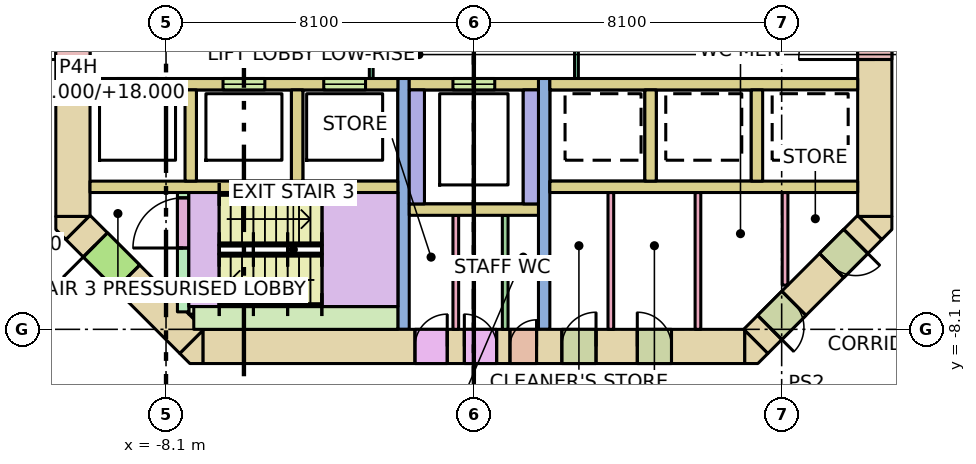
"""IFC4 building model, lengths in metres.
Left out: names, types, materials, properties, quantities, classifications, styles, units other than length and angle.
Written with IfcOpenShell. Run it as: python <this file> out.ifc"""

import sys

from ifc_helpers import new_model, si_unit, direction, frame, frame_2d, origin, place, context, subcontext, project, spatial, polyline, rectangle, outline, extrude, element, fill, save


model = new_model("IFC4")
c1 = context("Model", 3, precision=1e-05, world=origin(), true_north=direction((0.0, 1.0)))
c2 = subcontext(c1, "Body", "Model", "MODEL_VIEW")
j1 = project(units=[si_unit("LENGTHUNIT", "METRE"), si_unit("PLANEANGLEUNIT", "RADIAN")], contexts=[c1])
p1 = place(None, origin())
s1 = spatial("IfcSite", under=j1, at=p1, CompositionType="ELEMENT")
p2 = place(p1, origin())
s2 = spatial("IfcBuilding", under=s1, at=p2, CompositionType="ELEMENT")
p3 = place(p2, frame((0.0, 0.0, 13.0)))
s3 = spatial("IfcBuildingStorey", under=s2, at=p3, CompositionType="ELEMENT", Elevation=13.0)
p4 = place(p3, frame((-7.13, -8.55, -0.32), z_axis=(0.0, 0.0, 1.0), x_axis=(1.0, 0.0, 0.0)))
e1 = element("IfcWall", 1, at=p4, inside=s3, PredefinedType="SHEAR", context=c2, shape_type="SweptSolid", body=[
    extrude(rectangle(XDim=14.26, YDim=0.9, at=frame_2d((7.13, 0.0))), origin(), (0.0, 0.0, 1.0), 7.0),
])
p5 = place(p4, frame((8.08, 0.0, 0.32)))
e2 = element("IfcOpeningElement", 2, at=p5, cuts=e1, PredefinedType="OPENING", context=c2, shape_type="SweptSolid", body=[
    extrude(rectangle(XDim=0.7, YDim=2.1, at=frame_2d((0.35, 1.05))), frame((0.0, 0.46, 0.0), z_axis=(0.0, -1.0, 0.0), x_axis=(1.0, 0.0, 0.0)), (0.0, 0.0, 1.0), 0.92),
])
p6 = place(p4, frame((5.58, 0.0, 0.32)))
e3 = element("IfcOpeningElement", 3, at=p6, cuts=e1, PredefinedType="OPENING", context=c2, shape_type="SweptSolid", body=[
    extrude(rectangle(XDim=0.85, YDim=2.1, at=frame_2d((0.425, 1.05))), frame((0.0, 0.46, 0.0), z_axis=(0.0, -1.0, 0.0), x_axis=(1.0, 0.0, 0.0)), (0.0, 0.0, 1.0), 0.92),
])
p7 = place(p4, frame((6.88, 0.0, 0.32)))
e4 = element("IfcOpeningElement", 4, at=p7, cuts=e1, PredefinedType="OPENING", context=c2, shape_type="SweptSolid", body=[
    extrude(rectangle(XDim=0.85, YDim=2.1, at=frame_2d((0.425, 1.05))), frame((0.0, 0.46, 0.0), z_axis=(0.0, -1.0, 0.0), x_axis=(1.0, 0.0, 0.0)), (0.0, 0.0, 1.0), 0.92),
])
p8 = place(p4, frame((9.445, 0.0, 0.32)))
e5 = element("IfcOpeningElement", 5, at=p8, cuts=e1, PredefinedType="OPENING", context=c2, shape_type="SweptSolid", body=[
    extrude(rectangle(XDim=0.9, YDim=2.1, at=frame_2d((0.45, 1.05))), frame((0.0, 0.46, 0.0), z_axis=(0.0, -1.0, 0.0), x_axis=(1.0, 0.0, 0.0)), (0.0, 0.0, 1.0), 0.92),
])
p9 = place(p4, frame((11.431, 0.0, 0.32)))
e6 = element("IfcOpeningElement", 6, at=p9, cuts=e1, PredefinedType="OPENING", context=c2, shape_type="SweptSolid", body=[
    extrude(rectangle(XDim=0.9, YDim=2.1, at=frame_2d((0.45, 1.05))), frame((0.0, 0.46, 0.0), z_axis=(0.0, -1.0, 0.0), x_axis=(1.0, 0.0, 0.0)), (0.0, 0.0, 1.0), 0.92),
])
p10 = place(p3, frame((-10.55, -5.13, -0.32), z_axis=(0.0, 0.0, 1.0), x_axis=(0.0, 1.0, 0.0)))
e7 = element("IfcWall", 7, at=p10, inside=s3, PredefinedType="SHEAR", context=c2, shape_type="SweptSolid", body=[
    extrude(rectangle(XDim=10.26, YDim=0.9, at=frame_2d((5.13, 0.0))), origin(), (0.0, 0.0, 1.0), 7.0),
])
p11 = place(p10, frame((4.13, 0.0, 0.32)))
e8 = element("IfcOpeningElement", 8, at=p11, cuts=e7, PredefinedType="OPENING", context=c2, shape_type="SweptSolid", body=[
    extrude(rectangle(XDim=2.0, YDim=2.1, at=frame_2d((1.0, 1.05))), frame((0.0, 0.46, 0.0), z_axis=(0.0, -1.0, 0.0), x_axis=(1.0, 0.0, 0.0)), (0.0, 0.0, 1.0), 0.92),
])
p12 = place(p3, frame((10.55, -5.13, -0.32), z_axis=(0.0, 0.0, 1.0), x_axis=(0.0, 1.0, 0.0)))
e9 = element("IfcWall", 9, at=p12, inside=s3, PredefinedType="SHEAR", context=c2, shape_type="SweptSolid", body=[
    extrude(rectangle(XDim=10.26, YDim=0.9, at=frame_2d((5.13, 0.0))), origin(), (0.0, 0.0, 1.0), 7.0),
])
p13 = place(p12, frame((4.13, 0.0, 0.32)))
e10 = element("IfcOpeningElement", 10, at=p13, cuts=e9, PredefinedType="OPENING", context=c2, shape_type="SweptSolid", body=[
    extrude(rectangle(XDim=2.0, YDim=2.1, at=frame_2d((1.0, 1.05))), frame((0.0, 0.46, 0.0), z_axis=(0.0, -1.0, 0.0), x_axis=(1.0, 0.0, 0.0)), (0.0, 0.0, 1.0), 0.92),
])
p14 = place(p3, frame((10.418, -5.418, -0.32), z_axis=(0.0, 0.0, 1.0), x_axis=(-0.707106781187, -0.707106781187, 0.0)))
e11 = element("IfcWall", 11, at=p14, inside=s3, PredefinedType="SHEAR", context=c2, shape_type="SweptSolid", body=[
    extrude(rectangle(XDim=4.243, YDim=0.9, at=frame_2d((2.121, 0.0))), origin(), (0.0, 0.0, 1.0), 7.0),
])
p15 = place(p14, frame((2.823, 0.0, 0.32)))
e12 = element("IfcOpeningElement", 12, at=p15, cuts=e11, PredefinedType="OPENING", context=c2, shape_type="SweptSolid", body=[
    extrude(rectangle(XDim=0.9, YDim=2.1, at=frame_2d((0.45, 1.05))), frame((0.0, 0.46, 0.0), z_axis=(0.0, -1.0, 0.0), x_axis=(1.0, 0.0, 0.0)), (0.0, 0.0, 1.0), 0.92),
])
p16 = place(p14, frame((0.52, 0.0, 0.32)))
e13 = element("IfcOpeningElement", 13, at=p16, cuts=e11, PredefinedType="OPENING", context=c2, shape_type="SweptSolid", body=[
    extrude(rectangle(XDim=0.9, YDim=2.1, at=frame_2d((0.45, 1.05))), frame((0.0, 0.46, 0.0), z_axis=(0.0, -1.0, 0.0), x_axis=(1.0, 0.0, 0.0)), (0.0, 0.0, 1.0), 0.92),
])
p17 = place(p3, frame((-7.418, -8.418, -0.32), z_axis=(0.0, 0.0, 1.0), x_axis=(-0.707106781187, 0.707106781187, 0.0)))
e14 = element("IfcWall", 14, at=p17, inside=s3, PredefinedType="SHEAR", context=c2, shape_type="SweptSolid", body=[
    extrude(rectangle(XDim=4.243, YDim=0.9, at=frame_2d((2.121, 0.0))), origin(), (0.0, 0.0, 1.0), 7.0),
])
p18 = place(p17, frame((2.393, 0.0, 0.32)))
e15 = element("IfcOpeningElement", 15, at=p18, cuts=e14, PredefinedType="OPENING", context=c2, shape_type="SweptSolid", body=[
    extrude(rectangle(XDim=1.2, YDim=2.1, at=frame_2d((0.6, 1.05))), frame((0.0, 0.46, 0.0), z_axis=(0.0, -1.0, 0.0), x_axis=(1.0, 0.0, 0.0)), (0.0, 0.0, 1.0), 0.92),
])
p19 = place(p3, frame((0.0, 0.0, -0.32)))
e16 = element("IfcWall", 16, at=p19, inside=s3, PredefinedType="SHEAR", context=c2, shape_type="SweptSolid", body=[
    extrude(outline(polyline([(-7.473, -9.0), (-7.736, -8.736), (-7.13, -8.13), (-7.13, -9.0), (-7.473, -9.0)])), origin(), (0.0, 0.0, 1.0), 7.0),
])
p20 = place(p3, frame((0.0, 0.0, -0.32)))
e17 = element("IfcWall", 17, at=p20, inside=s3, PredefinedType="SHEAR", context=c2, shape_type="SweptSolid", body=[
    extrude(outline(polyline([(7.473, -9.0), (7.13, -9.0), (7.13, -8.13), (7.736, -8.736), (7.473, -9.0)])), origin(), (0.0, 0.0, 1.0), 7.0),
])
p21 = place(p3, frame((0.0, 0.0, -0.32)))
e18 = element("IfcWall", 18, at=p21, inside=s3, PredefinedType="SHEAR", context=c2, shape_type="SweptSolid", body=[
    extrude(outline(polyline([(-11.0, -5.473), (-11.0, -5.13), (-10.13, -5.13), (-10.736, -5.736), (-11.0, -5.473)])), origin(), (0.0, 0.0, 1.0), 7.0),
])
p22 = place(p3, frame((0.0, 0.0, -0.32)))
e19 = element("IfcWall", 19, at=p22, inside=s3, PredefinedType="SHEAR", context=c2, shape_type="SweptSolid", body=[
    extrude(outline(polyline([(11.0, -5.473), (10.736, -5.736), (10.13, -5.13), (11.0, -5.13), (11.0, -5.473)])), origin(), (0.0, 0.0, 1.0), 7.0),
])
for number, where, z_axis, x_axis in (
    (20, (-10.1, -4.35, 0.0), (0.0, 0.0, 1.0), (1.0, 0.0, 0.0)),
    (21, (2.0, -4.35, 0.0), (0.0, 0.0, 1.0), (1.0, 0.0, 0.0)),
):
    element("IfcWall", number, at=place(p3, frame(where, z_axis=z_axis, x_axis=x_axis)), inside=s3, PredefinedType="SOLIDWALL", context=c2, shape_type="SweptSolid", body=[
        extrude(rectangle(XDim=8.1, YDim=0.3, at=frame_2d((4.05, 0.0))), origin(), (0.0, 0.0, 1.0), 6.68),
    ])
p23 = place(p3, frame((-10.1, -1.65, 0.0), z_axis=(0.0, 0.0, 1.0), x_axis=(1.0, 0.0, 0.0)))
e22 = element("IfcWall", 22, at=p23, inside=s3, PredefinedType="SOLIDWALL", context=c2, shape_type="SweptSolid", body=[
    extrude(rectangle(XDim=8.1, YDim=0.3, at=frame_2d((4.05, 0.0))), origin(), (0.0, 0.0, 1.0), 6.68),
])
p24 = place(p23, frame((0.7, 0.0, 0.0)))
e23 = element("IfcOpeningElement", 23, at=p24, cuts=e22, PredefinedType="OPENING", context=c2, shape_type="SweptSolid", body=[
    extrude(rectangle(XDim=1.1, YDim=2.1, at=frame_2d((0.55, 1.05))), frame((0.0, 0.16, 0.0), z_axis=(0.0, -1.0, 0.0), x_axis=(1.0, 0.0, 0.0)), (0.0, 0.0, 1.0), 0.32),
])
p25 = place(p23, frame((3.5, 0.0, 0.0)))
e24 = element("IfcOpeningElement", 24, at=p25, cuts=e22, PredefinedType="OPENING", context=c2, shape_type="SweptSolid", body=[
    extrude(rectangle(XDim=1.1, YDim=2.1, at=frame_2d((0.55, 1.05))), frame((0.0, 0.16, 0.0), z_axis=(0.0, -1.0, 0.0), x_axis=(1.0, 0.0, 0.0)), (0.0, 0.0, 1.0), 0.32),
])
p26 = place(p23, frame((6.15, 0.0, 0.0)))
e25 = element("IfcOpeningElement", 25, at=p26, cuts=e22, PredefinedType="OPENING", context=c2, shape_type="SweptSolid", body=[
    extrude(rectangle(XDim=1.1, YDim=2.1, at=frame_2d((0.55, 1.05))), frame((0.0, 0.16, 0.0), z_axis=(0.0, -1.0, 0.0), x_axis=(1.0, 0.0, 0.0)), (0.0, 0.0, 1.0), 0.32),
])
p27 = place(p3, frame((2.0, -1.65, 0.0), z_axis=(0.0, 0.0, 1.0), x_axis=(1.0, 0.0, 0.0)))
e26 = element("IfcWall", 26, at=p27, inside=s3, PredefinedType="SOLIDWALL", context=c2, shape_type="SweptSolid", body=[
    extrude(rectangle(XDim=8.1, YDim=0.3, at=frame_2d((4.05, 0.0))), origin(), (0.0, 0.0, 1.0), 6.68),
])
for number, where, z_axis, x_axis in (
    (27, (-7.45, -4.2, 0.0), (0.0, 0.0, 1.0), (0.0, 1.0, 0.0)),
    (28, (-4.65, -4.2, 0.0), (0.0, 0.0, 1.0), (0.0, 1.0, 0.0)),
    (29, (4.65, -4.2, 0.0), (0.0, 0.0, 1.0), (0.0, 1.0, 0.0)),
    (30, (7.45, -4.2, 0.0), (0.0, 0.0, 1.0), (0.0, 1.0, 0.0)),
):
    element("IfcWall", number, at=place(p3, frame(where, z_axis=z_axis, x_axis=x_axis)), inside=s3, PredefinedType="SOLIDWALL", context=c2, shape_type="SweptSolid", body=[
        extrude(rectangle(XDim=2.4, YDim=0.3, at=frame_2d((1.2, 0.0))), origin(), (0.0, 0.0, 1.0), 6.68),
    ])
for number, where, z_axis, x_axis in (
    (31, (-1.85, -8.1, 0.0), (0.0, 0.0, 1.0), (0.0, 1.0, 0.0)),
    (32, (1.85, -8.1, 0.0), (0.0, 0.0, 1.0), (0.0, 1.0, 0.0)),
):
    element("IfcWall", number, at=place(p3, frame(where, z_axis=z_axis, x_axis=x_axis)), inside=s3, PredefinedType="SHEAR", context=c2, shape_type="SweptSolid", body=[
        extrude(rectangle(XDim=6.6, YDim=0.3, at=frame_2d((3.3, 0.0))), origin(), (0.0, 0.0, 1.0), 6.68),
    ])
p28 = place(p3, frame((-1.7, -1.65, 0.0), z_axis=(0.0, 0.0, 1.0), x_axis=(1.0, 0.0, 0.0)))
e33 = element("IfcWall", 33, at=p28, inside=s3, PredefinedType="SOLIDWALL", context=c2, shape_type="SweptSolid", body=[
    extrude(rectangle(XDim=3.4, YDim=0.3, at=frame_2d((1.7, 0.0))), origin(), (0.0, 0.0, 1.0), 6.68),
])
p29 = place(p28, frame((1.15, 0.0, 0.0)))
e34 = element("IfcOpeningElement", 34, at=p29, cuts=e33, PredefinedType="OPENING", context=c2, shape_type="SweptSolid", body=[
    extrude(rectangle(XDim=1.1, YDim=2.1, at=frame_2d((0.55, 1.05))), frame((0.0, 0.16, 0.0), z_axis=(0.0, -1.0, 0.0), x_axis=(1.0, 0.0, 0.0)), (0.0, 0.0, 1.0), 0.32),
])
for number, where, z_axis, x_axis in (
    (35, (-1.5, -4.8, 0.0), (0.0, 0.0, 1.0), (0.0, 1.0, 0.0)),
    (36, (1.5, -4.8, 0.0), (0.0, 0.0, 1.0), (0.0, 1.0, 0.0)),
):
    element("IfcWall", number, at=place(p3, frame(where, z_axis=z_axis, x_axis=x_axis)), inside=s3, PredefinedType="SOLIDWALL", context=c2, shape_type="SweptSolid", body=[
        extrude(rectangle(XDim=3.0, YDim=0.4, at=frame_2d((1.5, 0.0))), origin(), (0.0, 0.0, 1.0), 6.68),
    ])
p30 = place(p3, frame((-1.7, -4.95, 0.0), z_axis=(0.0, 0.0, 1.0), x_axis=(1.0, 0.0, 0.0)))
e37 = element("IfcWall", 37, at=p30, inside=s3, PredefinedType="SOLIDWALL", context=c2, shape_type="SweptSolid", body=[
    extrude(rectangle(XDim=3.4, YDim=0.3, at=frame_2d((1.7, 0.0))), origin(), (0.0, 0.0, 1.0), 6.68),
])
p31 = place(p3, frame((-7.65, -7.64, 0.0), z_axis=(0.0, 0.0, 1.0), x_axis=(0.0, 1.0, 0.0)))
e38 = element("IfcWall", 38, at=p31, inside=s3, PredefinedType="SHEAR", context=c2, shape_type="SweptSolid", body=[
    extrude(rectangle(XDim=3.14, YDim=0.3, at=frame_2d((1.57, 0.0))), origin(), (0.0, 0.0, 1.0), 6.68),
])
p32 = place(p31, frame((1.68, 0.0, 0.0)))
e39 = element("IfcOpeningElement", 39, at=p32, cuts=e38, PredefinedType="OPENING", context=c2, shape_type="SweptSolid", body=[
    extrude(rectangle(XDim=1.32, YDim=2.1, at=frame_2d((0.66, 1.05))), frame((0.0, 0.16, 0.0), z_axis=(0.0, -1.0, 0.0), x_axis=(1.0, 0.0, 0.0)), (0.0, 0.0, 1.0), 0.32),
])
p33 = place(p3, frame((-7.5, -7.6, 0.0), z_axis=(0.0, 0.0, 1.0), x_axis=(1.0, 0.0, 0.0)))
e40 = element("IfcWall", 40, at=p33, inside=s3, PredefinedType="SHEAR", context=c2, shape_type="SweptSolid", body=[
    extrude(rectangle(XDim=0.6, YDim=0.2, at=frame_2d((0.3, 0.0))), origin(), (0.0, 0.0, 1.0), 6.68),
])
p34 = place(p3, frame((-7.37, -7.8, 0.0), z_axis=(0.0, 0.0, 1.0), x_axis=(1.0, 0.0, 0.0)))
e41 = element("IfcWall", 41, at=p34, inside=s3, PredefinedType="SHEAR", context=c2, shape_type="SweptSolid", body=[
    extrude(rectangle(XDim=5.37, YDim=0.6, at=frame_2d((2.685, 0.0))), origin(), (0.0, 0.0, 1.0), 6.68),
])
p35 = place(p3, frame((-2.7, -1.5, 0.0), z_axis=(0.0, 0.0, 1.0), x_axis=(0.0, 1.0, 0.0)))
e42 = element("IfcWall", 42, at=p35, inside=s3, PredefinedType="PARTITIONING", context=c2, shape_type="SweptSolid", body=[
    extrude(rectangle(XDim=3.0, YDim=0.1, at=frame_2d((1.5, 0.0))), origin(), (0.0, 0.0, 1.0), 6.68),
])
p36 = place(p35, frame((0.9, 0.0, 0.0)))
e43 = element("IfcOpeningElement", 43, at=p36, cuts=e42, PredefinedType="OPENING", context=c2, shape_type="SweptSolid", body=[
    extrude(rectangle(XDim=1.2, YDim=2.1, at=frame_2d((0.6, 1.05))), frame((0.0, 0.06, 0.0), z_axis=(0.0, -1.0, 0.0), x_axis=(1.0, 0.0, 0.0)), (0.0, 0.0, 1.0), 0.12),
])
p37 = place(p3, frame((2.7, -1.5, 0.0), z_axis=(0.0, 0.0, 1.0), x_axis=(0.0, 1.0, 0.0)))
e44 = element("IfcWall", 44, at=p37, inside=s3, PredefinedType="PARTITIONING", context=c2, shape_type="SweptSolid", body=[
    extrude(rectangle(XDim=3.0, YDim=0.1, at=frame_2d((1.5, 0.0))), origin(), (0.0, 0.0, 1.0), 6.68),
])
p38 = place(p37, frame((0.9, 0.0, 0.0)))
e45 = element("IfcOpeningElement", 45, at=p38, cuts=e44, PredefinedType="OPENING", context=c2, shape_type="SweptSolid", body=[
    extrude(rectangle(XDim=1.2, YDim=2.1, at=frame_2d((0.6, 1.05))), frame((0.0, 0.06, 0.0), z_axis=(0.0, -1.0, 0.0), x_axis=(1.0, 0.0, 0.0)), (0.0, 0.0, 1.0), 0.12),
])
for number, where, z_axis, x_axis in (
    (46, (0.825, -8.1, 0.0), (0.0, 0.0, 1.0), (0.0, 1.0, 0.0)),
    (47, (-0.475, -8.1, 0.0), (0.0, 0.0, 1.0), (0.0, 1.0, 0.0)),
):
    element("IfcWall", number, at=place(p3, frame(where, z_axis=z_axis, x_axis=x_axis)), inside=s3, PredefinedType="PARTITIONING", context=c2, shape_type="SweptSolid", body=[
        extrude(rectangle(XDim=3.0, YDim=0.15, at=frame_2d((1.5, 0.0))), origin(), (0.0, 0.0, 1.0), 6.68),
    ])
for number, where, z_axis, x_axis in (
    (48, (3.605, -8.1, 0.0), (0.0, 0.0, 1.0), (0.0, 1.0, 0.0)),
    (49, (5.897, -8.1, 0.0), (0.0, 0.0, 1.0), (0.0, 1.0, 0.0)),
):
    element("IfcWall", number, at=place(p3, frame(where, z_axis=z_axis, x_axis=x_axis)), inside=s3, PredefinedType="PARTITIONING", context=c2, shape_type="SweptSolid", body=[
        extrude(rectangle(XDim=3.6, YDim=0.15, at=frame_2d((1.8, 0.0))), origin(), (0.0, 0.0, 1.0), 6.68),
    ])
p39 = place(p3, frame((8.189, -6.936, 0.0), z_axis=(0.0, 0.0, 1.0), x_axis=(0.0, 1.0, 0.0)))
e50 = element("IfcWall", 50, at=p39, inside=s3, PredefinedType="PARTITIONING", context=c2, shape_type="SweptSolid", body=[
    extrude(rectangle(XDim=2.436, YDim=0.15, at=frame_2d((1.218, 0.0))), origin(), (0.0, 0.0, 1.0), 6.68),
])
p40 = place(p24, origin())
e51 = element("IfcDoor", 51, at=p40, inside=s3, OperationType="DOUBLE_DOOR_SLIDING", PredefinedType="DOOR", context=c2, shape_type="SweptSolid", body=[
    extrude(rectangle(XDim=1.1, YDim=2.1, at=frame_2d((0.55, 1.05))), frame((0.0, 0.025, 0.0), z_axis=(0.0, -1.0, 0.0), x_axis=(1.0, 0.0, 0.0)), (0.0, 0.0, 1.0), 0.05),
])
fill(e23, e51)
p41 = place(p25, origin())
e52 = element("IfcDoor", 52, at=p41, inside=s3, OperationType="DOUBLE_DOOR_SLIDING", PredefinedType="DOOR", context=c2, shape_type="SweptSolid", body=[
    extrude(rectangle(XDim=1.1, YDim=2.1, at=frame_2d((0.55, 1.05))), frame((0.0, 0.025, 0.0), z_axis=(0.0, -1.0, 0.0), x_axis=(1.0, 0.0, 0.0)), (0.0, 0.0, 1.0), 0.05),
])
fill(e24, e52)
p42 = place(p26, origin())
e53 = element("IfcDoor", 53, at=p42, inside=s3, OperationType="DOUBLE_DOOR_SLIDING", PredefinedType="DOOR", context=c2, shape_type="SweptSolid", body=[
    extrude(rectangle(XDim=1.1, YDim=2.1, at=frame_2d((0.55, 1.05))), frame((0.0, 0.025, 0.0), z_axis=(0.0, -1.0, 0.0), x_axis=(1.0, 0.0, 0.0)), (0.0, 0.0, 1.0), 0.05),
])
fill(e25, e53)
p43 = place(p29, origin())
e54 = element("IfcDoor", 54, at=p43, inside=s3, OperationType="DOUBLE_DOOR_SLIDING", PredefinedType="DOOR", context=c2, shape_type="SweptSolid", body=[
    extrude(rectangle(XDim=1.1, YDim=2.1, at=frame_2d((0.55, 1.05))), frame((0.0, 0.025, 0.0), z_axis=(0.0, -1.0, 0.0), x_axis=(1.0, 0.0, 0.0)), (0.0, 0.0, 1.0), 0.05),
])
fill(e34, e54)
p44 = place(p32, origin())
e55 = element("IfcDoor", 55, at=p44, inside=s3, OperationType="DOUBLE_DOOR_SINGLE_SWING", PredefinedType="DOOR", context=c2, shape_type="SweptSolid", body=[
    extrude(rectangle(XDim=1.32, YDim=2.1, at=frame_2d((0.66, 1.05))), frame((0.0, 0.025, 0.0), z_axis=(0.0, -1.0, 0.0), x_axis=(1.0, 0.0, 0.0)), (0.0, 0.0, 1.0), 0.05),
])
fill(e39, e55)
p45 = place(p18, origin())
e56 = element("IfcDoor", 56, at=p45, inside=s3, OperationType="SINGLE_SWING_RIGHT", PredefinedType="DOOR", context=c2, shape_type="SweptSolid", body=[
    extrude(rectangle(XDim=1.2, YDim=2.1, at=frame_2d((0.6, 1.05))), frame((0.0, 0.025, 0.0), z_axis=(0.0, -1.0, 0.0), x_axis=(1.0, 0.0, 0.0)), (0.0, 0.0, 1.0), 0.05),
])
fill(e15, e56)
p46 = place(p11, origin())
e57 = element("IfcDoor", 57, at=p46, inside=s3, OperationType="DOUBLE_DOOR_SINGLE_SWING", PredefinedType="DOOR", context=c2, shape_type="SweptSolid", body=[
    extrude(rectangle(XDim=2.0, YDim=2.1, at=frame_2d((1.0, 1.05))), frame((0.0, 0.025, 0.0), z_axis=(0.0, -1.0, 0.0), x_axis=(1.0, 0.0, 0.0)), (0.0, 0.0, 1.0), 0.05),
])
fill(e8, e57)
p47 = place(p13, origin())
e58 = element("IfcDoor", 58, at=p47, inside=s3, OperationType="DOUBLE_DOOR_SINGLE_SWING", PredefinedType="DOOR", context=c2, shape_type="SweptSolid", body=[
    extrude(rectangle(XDim=2.0, YDim=2.1, at=frame_2d((1.0, 1.05))), frame((0.0, 0.025, 0.0), z_axis=(0.0, -1.0, 0.0), x_axis=(1.0, 0.0, 0.0)), (0.0, 0.0, 1.0), 0.05),
])
fill(e10, e58)
p48 = place(p5, origin())
e59 = element("IfcDoor", 59, at=p48, inside=s3, OperationType="SINGLE_SWING_RIGHT", PredefinedType="DOOR", context=c2, shape_type="SweptSolid", body=[
    extrude(rectangle(XDim=0.7, YDim=2.1, at=frame_2d((0.35, 1.05))), frame((0.0, 0.025, 0.0), z_axis=(0.0, -1.0, 0.0), x_axis=(1.0, 0.0, 0.0)), (0.0, 0.0, 1.0), 0.05),
])
fill(e2, e59)
p49 = place(p6, origin())
e60 = element("IfcDoor", 60, at=p49, inside=s3, OperationType="SINGLE_SWING_RIGHT", PredefinedType="DOOR", context=c2, shape_type="SweptSolid", body=[
    extrude(rectangle(XDim=0.85, YDim=2.1, at=frame_2d((0.425, 1.05))), frame((0.0, 0.025, 0.0), z_axis=(0.0, -1.0, 0.0), x_axis=(1.0, 0.0, 0.0)), (0.0, 0.0, 1.0), 0.05),
])
fill(e3, e60)
p50 = place(p7, origin())
e61 = element("IfcDoor", 61, at=p50, inside=s3, OperationType="SINGLE_SWING_LEFT", PredefinedType="DOOR", context=c2, shape_type="SweptSolid", body=[
    extrude(rectangle(XDim=0.85, YDim=2.1, at=frame_2d((0.425, 1.05))), frame((0.0, 0.025, 0.0), z_axis=(0.0, -1.0, 0.0), x_axis=(1.0, 0.0, 0.0)), (0.0, 0.0, 1.0), 0.05),
])
fill(e4, e61)
p51 = place(p8, origin())
e62 = element("IfcDoor", 62, at=p51, inside=s3, OperationType="SINGLE_SWING_RIGHT", PredefinedType="DOOR", context=c2, shape_type="SweptSolid", body=[
    extrude(rectangle(XDim=0.9, YDim=2.1, at=frame_2d((0.45, 1.05))), frame((0.0, 0.025, 0.0), z_axis=(0.0, -1.0, 0.0), x_axis=(1.0, 0.0, 0.0)), (0.0, 0.0, 1.0), 0.05),
])
fill(e5, e62)
p52 = place(p9, origin())
e63 = element("IfcDoor", 63, at=p52, inside=s3, OperationType="SINGLE_SWING_LEFT", PredefinedType="DOOR", context=c2, shape_type="SweptSolid", body=[
    extrude(rectangle(XDim=0.9, YDim=2.1, at=frame_2d((0.45, 1.05))), frame((0.0, 0.025, 0.0), z_axis=(0.0, -1.0, 0.0), x_axis=(1.0, 0.0, 0.0)), (0.0, 0.0, 1.0), 0.05),
])
fill(e6, e63)
p53 = place(p15, origin())
e64 = element("IfcDoor", 64, at=p53, inside=s3, OperationType="SINGLE_SWING_RIGHT", PredefinedType="DOOR", context=c2, shape_type="SweptSolid", body=[
    extrude(rectangle(XDim=0.9, YDim=2.1, at=frame_2d((0.45, 1.05))), frame((0.0, 0.025, 0.0), z_axis=(0.0, -1.0, 0.0), x_axis=(1.0, 0.0, 0.0)), (0.0, 0.0, 1.0), 0.05),
])
fill(e12, e64)
p54 = place(p16, origin())
e65 = element("IfcDoor", 65, at=p54, inside=s3, OperationType="SINGLE_SWING_LEFT", PredefinedType="DOOR", context=c2, shape_type="SweptSolid", body=[
    extrude(rectangle(XDim=0.9, YDim=2.1, at=frame_2d((0.45, 1.05))), frame((0.0, 0.025, 0.0), z_axis=(0.0, -1.0, 0.0), x_axis=(1.0, 0.0, 0.0)), (0.0, 0.0, 1.0), 0.05),
])
fill(e13, e65)
save(model, sys.argv[1])
